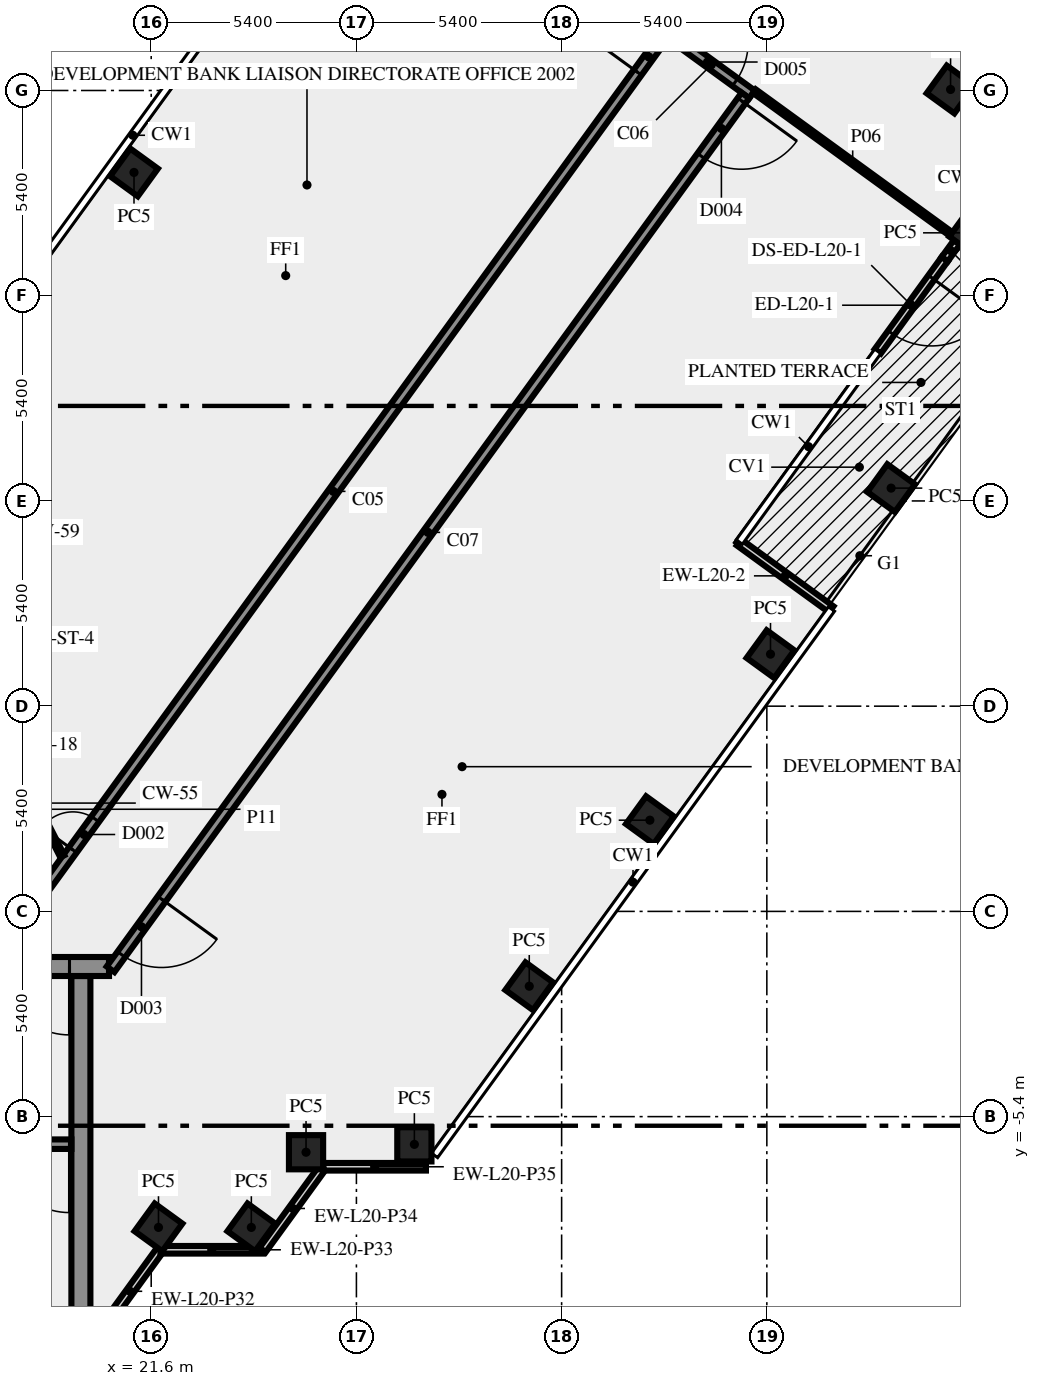
"""IFC4 building model, lengths in metres.
Left out: names, types, materials, properties, quantities, classifications, styles, units other than length and angle.
Written with IfcOpenShell. Run it as: python <this file> out.ifc"""

import sys

from ifc_helpers import new_model, si_unit, direction, frame, frame_2d, origin, origin_2d, place, context, subcontext, project, spatial, rectangle, extrude, element, fill, save


model = new_model("IFC4")
c1 = context("Model", 3, precision=1e-05, world=origin(), true_north=direction((0.0, 1.0)))
c2 = subcontext(c1, "Body", "Model", "MODEL_VIEW")
j1 = project(units=[si_unit("LENGTHUNIT", "METRE"), si_unit("PLANEANGLEUNIT", "RADIAN")], contexts=[c1])
p1 = place(None, origin())
s1 = spatial("IfcSite", under=j1, at=p1, CompositionType="ELEMENT")
p2 = place(p1, origin())
s2 = spatial("IfcBuilding", under=s1, at=p2, CompositionType="ELEMENT")
p3 = place(p2, frame((0.0, 0.0, 89.0)))
s3 = spatial("IfcBuildingStorey", under=s2, at=p3, CompositionType="ELEMENT", Elevation=89.0)
for number, where, z_axis, x_axis in (
    (1, (21.792, -8.315, 0.0), (0.0, 0.0, 1.0), (0.588, 0.809, 0.0)),
    (2, (24.235, -8.315, 0.0), (0.0, 0.0, 1.0), (0.588, 0.809, 0.0)),
    (3, (25.674, -6.337, 0.0), (0.0, 0.0, 1.0), (1.0, 0.0, 0.0)),
    (4, (28.525, -6.13, 0.0), (0.0, 0.0, 1.0), (1.0, 0.0, 0.0)),
    (5, (31.548, -1.969, 0.0), (0.0, 0.0, 1.0), (0.588, 0.809, 0.0)),
    (6, (34.722, 2.4, 0.0), (0.0, 0.0, 1.0), (0.588, 0.809, 0.0)),
    (7, (37.896, 6.769, 0.0), (0.0, 0.0, 1.0), (0.588, 0.809, 0.0)),
    (8, (41.07, 11.137, 0.0), (0.0, 0.0, 1.0), (0.588, 0.809, 0.0)),
    (9, (43.231, 17.854, 0.0), (0.0, 0.0, 1.0), (0.588, 0.809, 0.0)),
    (10, (42.635, 21.626, 0.0), (0.0, 0.0, 1.0), (-0.809, 0.588, 0.0)),
    (11, (21.147, 19.444, 0.0), (0.0, 0.0, 1.0), (-0.588, -0.809, 0.0)),
):
    element("IfcColumn", number, at=place(p3, frame(where, z_axis=z_axis, x_axis=x_axis)), inside=s3, PredefinedType="COLUMN", context=c2, shape_type="SweptSolid", body=[
        extrude(rectangle(XDim=0.9, YDim=0.9, at=origin_2d()), origin(), (0.0, 0.0, 1.0), 3.65),
    ])
p4 = place(p3, frame((39.494, 7.947, 0.0), z_axis=(0.0, 0.0, 1.0), x_axis=(-0.808999938455, 0.587808727036, 0.0)))
e12 = element("IfcWall", 12, at=p4, inside=s3, PredefinedType="SOLIDWALL", context=c2, shape_type="SweptSolid", body=[
    extrude(rectangle(XDim=3.0, YDim=0.2, at=frame_2d((1.5, 0.0))), origin(), (0.0, 0.0, 1.0), 3.65),
])
p5 = place(p3, frame((42.482, 17.164, 0.0), z_axis=(0.0, 0.0, 1.0), x_axis=(-0.587808727036, -0.808999938455, 0.0)))
e13 = element("IfcWall", 13, at=p5, inside=s3, PredefinedType="SOLIDWALL", context=c2, shape_type="SweptSolid", body=[
    extrude(rectangle(XDim=3.0, YDim=0.2, at=frame_2d((1.5, 0.0))), origin(), (0.0, 0.0, 1.0), 3.65),
])
p6 = place(p5, frame((0.6, 0.0, 0.0)))
e14 = element("IfcOpeningElement", 14, at=p6, cuts=e13, PredefinedType="OPENING", context=c2, shape_type="SweptSolid", body=[
    extrude(rectangle(XDim=1.8, YDim=2.4, at=frame_2d((0.9, 1.2))), frame((0.0, 0.11, 0.0), z_axis=(0.0, -1.0, 0.0), x_axis=(1.0, 0.0, 0.0)), (0.0, 0.0, 1.0), 0.22),
])
p7 = place(p3, frame((20.253, -11.083, 0.0), z_axis=(0.0, 0.0, 1.0), x_axis=(0.587766567315, 0.809030569476, 0.0)))
e15 = element("IfcWall", 15, at=p7, inside=s3, PredefinedType="SOLIDWALL", context=c2, shape_type="SweptSolid", body=[
    extrude(rectangle(XDim=2.688, YDim=0.2, at=frame_2d((1.344, 0.0))), origin(), (0.0, 0.0, 1.0), 3.65),
])
p8 = place(p3, frame((21.843, -8.904, 0.0), z_axis=(0.0, 0.0, 1.0), x_axis=(1.0, 0.0, 0.0)))
e16 = element("IfcWall", 16, at=p8, inside=s3, PredefinedType="SOLIDWALL", context=c2, shape_type="SweptSolid", body=[
    extrude(rectangle(XDim=2.7, YDim=0.2, at=frame_2d((1.35, 0.0))), origin(), (0.0, 0.0, 1.0), 3.65),
])
p9 = place(p3, frame((24.533, -8.909, 0.0), z_axis=(0.0, 0.0, 1.0), x_axis=(0.587720002413, 0.809064397168, 0.0)))
e17 = element("IfcWall", 17, at=p9, inside=s3, PredefinedType="SOLIDWALL", context=c2, shape_type="SweptSolid", body=[
    extrude(rectangle(XDim=2.7, YDim=0.2, at=frame_2d((1.35, 0.0))), origin(), (0.0, 0.0, 1.0), 3.65),
])
p10 = place(p3, frame((26.13, -6.719, 0.0), z_axis=(0.0, 0.0, 1.0), x_axis=(1.0, 0.0, 0.0)))
e18 = element("IfcWall", 18, at=p10, inside=s3, PredefinedType="SOLIDWALL", context=c2, shape_type="SweptSolid", body=[
    extrude(rectangle(XDim=2.7, YDim=0.2, at=frame_2d((1.35, 0.0))), origin(), (0.0, 0.0, 1.0), 3.65),
])
p11 = place(p3, frame((19.75, -10.5, 0.0), z_axis=(0.0, 0.0, 1.0), x_axis=(0.0, 1.0, 0.0)))
e19 = element("IfcWall", 19, at=p11, inside=s3, PredefinedType="SHEAR", context=c2, shape_type="SweptSolid", body=[
    extrude(rectangle(XDim=8.8, YDim=0.5, at=frame_2d((4.4, 0.0))), origin(), (0.0, 0.0, 1.0), 3.65),
])
p12 = place(p3, frame((19.5, -6.125, 0.0), z_axis=(0.0, 0.0, 1.0), x_axis=(-1.0, 0.0, 0.0)))
e20 = element("IfcWall", 20, at=p12, inside=s3, PredefinedType="SHEAR", context=c2, shape_type="SweptSolid", body=[
    extrude(rectangle(XDim=8.05, YDim=0.25, at=frame_2d((4.025, 0.0))), origin(), (0.0, 0.0, 1.0), 3.65),
])
p13 = place(p12, frame((0.05, 0.0, 0.0)))
e21 = element("IfcOpeningElement", 21, at=p13, cuts=e20, PredefinedType="OPENING", context=c2, shape_type="SweptSolid", body=[
    extrude(rectangle(XDim=1.8, YDim=2.1, at=frame_2d((0.9, 1.05))), frame((0.0, 0.135, 0.0), z_axis=(0.0, -1.0, 0.0), x_axis=(1.0, 0.0, 0.0)), (0.0, 0.0, 1.0), 0.27),
])
p14 = place(p3, frame((20.49, -1.45, 0.0), z_axis=(0.0, 0.0, 1.0), x_axis=(-1.0, 0.0, 0.0)))
e22 = element("IfcWall", 22, at=p14, inside=s3, PredefinedType="SHEAR", context=c2, shape_type="SweptSolid", body=[
    extrude(rectangle(XDim=40.98, YDim=0.5, at=frame_2d((20.49, 0.0))), origin(), (0.0, 0.0, 1.0), 3.65),
])
p15 = place(p14, frame((38.14, 0.0, 0.0)))
e23 = element("IfcOpeningElement", 23, at=p15, cuts=e22, PredefinedType="OPENING", context=c2, shape_type="SweptSolid", body=[
    extrude(rectangle(XDim=1.8, YDim=2.1, at=frame_2d((0.9, 1.05))), frame((0.0, 0.26, 0.0), z_axis=(0.0, -1.0, 0.0), x_axis=(1.0, 0.0, 0.0)), (0.0, 0.0, 1.0), 0.52),
])
p16 = place(p14, frame((35.89, 0.0, 0.0)))
e24 = element("IfcOpeningElement", 24, at=p16, cuts=e22, PredefinedType="OPENING", context=c2, shape_type="SweptSolid", body=[
    extrude(rectangle(XDim=0.9, YDim=2.1, at=frame_2d((0.45, 1.05))), frame((0.0, 0.26, 0.0), z_axis=(0.0, -1.0, 0.0), x_axis=(1.0, 0.0, 0.0)), (0.0, 0.0, 1.0), 0.52),
])
p17 = place(p14, frame((32.94, 0.0, 0.0)))
e25 = element("IfcOpeningElement", 25, at=p17, cuts=e22, PredefinedType="OPENING", context=c2, shape_type="SweptSolid", body=[
    extrude(rectangle(XDim=0.9, YDim=2.1, at=frame_2d((0.45, 1.05))), frame((0.0, 0.26, 0.0), z_axis=(0.0, -1.0, 0.0), x_axis=(1.0, 0.0, 0.0)), (0.0, 0.0, 1.0), 0.52),
])
p18 = place(p14, frame((21.765, 0.0, 0.0)))
e26 = element("IfcOpeningElement", 26, at=p18, cuts=e22, PredefinedType="OPENING", context=c2, shape_type="SweptSolid", body=[
    extrude(rectangle(XDim=2.0, YDim=2.1, at=frame_2d((1.0, 1.05))), frame((0.0, 0.26, 0.0), z_axis=(0.0, -1.0, 0.0), x_axis=(1.0, 0.0, 0.0)), (0.0, 0.0, 1.0), 0.52),
])
p19 = place(p14, frame((7.14, 0.0, 0.0)))
e27 = element("IfcOpeningElement", 27, at=p19, cuts=e22, PredefinedType="OPENING", context=c2, shape_type="SweptSolid", body=[
    extrude(rectangle(XDim=0.9, YDim=2.1, at=frame_2d((0.45, 1.05))), frame((0.0, 0.26, 0.0), z_axis=(0.0, -1.0, 0.0), x_axis=(1.0, 0.0, 0.0)), (0.0, 0.0, 1.0), 0.52),
])
p20 = place(p14, frame((5.028, 0.0, 0.0)))
e28 = element("IfcOpeningElement", 28, at=p20, cuts=e22, PredefinedType="OPENING", context=c2, shape_type="SweptSolid", body=[
    extrude(rectangle(XDim=0.8, YDim=2.1, at=frame_2d((0.4, 1.05))), frame((0.0, 0.26, 0.0), z_axis=(0.0, -1.0, 0.0), x_axis=(1.0, 0.0, 0.0)), (0.0, 0.0, 1.0), 0.52),
])
p21 = place(p14, frame((3.452, 0.0, 0.0)))
e29 = element("IfcOpeningElement", 29, at=p21, cuts=e22, PredefinedType="OPENING", context=c2, shape_type="SweptSolid", body=[
    extrude(rectangle(XDim=0.8, YDim=2.1, at=frame_2d((0.4, 1.05))), frame((0.0, 0.26, 0.0), z_axis=(0.0, -1.0, 0.0), x_axis=(1.0, 0.0, 0.0)), (0.0, 0.0, 1.0), 0.52),
])
p22 = place(p14, frame((1.04, 0.0, 0.0)))
e30 = element("IfcOpeningElement", 30, at=p22, cuts=e22, PredefinedType="OPENING", context=c2, shape_type="SweptSolid", body=[
    extrude(rectangle(XDim=1.8, YDim=2.1, at=frame_2d((0.9, 1.05))), frame((0.0, 0.26, 0.0), z_axis=(0.0, -1.0, 0.0), x_axis=(1.0, 0.0, 0.0)), (0.0, 0.0, 1.0), 0.52),
])
p23 = place(p3, frame((17.545, -1.125, 0.0), z_axis=(0.0, 0.0, 1.0), x_axis=(0.587786330937, 0.809016210693, 0.0)))
e31 = element("IfcWall", 31, at=p23, inside=s3, PredefinedType="SOLIDWALL", context=c2, shape_type="SweptSolid", body=[
    extrude(rectangle(XDim=30.103, YDim=0.25, at=frame_2d((15.052, 0.0))), origin(), (0.0, 0.0, 1.0), 3.65),
])
p24 = place(p23, frame((28.679, 0.0, 0.0)))
e32 = element("IfcOpeningElement", 32, at=p24, cuts=e31, PredefinedType="OPENING", context=c2, shape_type="SweptSolid", body=[
    extrude(rectangle(XDim=1.0, YDim=2.1, at=frame_2d((0.5, 1.05))), frame((0.0, 0.135, 0.0), z_axis=(0.0, -1.0, 0.0), x_axis=(1.0, 0.0, 0.0)), (0.0, 0.0, 1.0), 0.27),
])
p25 = place(p23, frame((3.391, 0.0, 0.0)))
e33 = element("IfcOpeningElement", 33, at=p25, cuts=e31, PredefinedType="OPENING", context=c2, shape_type="SweptSolid", body=[
    extrude(rectangle(XDim=1.0, YDim=2.1, at=frame_2d((0.5, 1.05))), frame((0.0, 0.135, 0.0), z_axis=(0.0, -1.0, 0.0), x_axis=(1.0, 0.0, 0.0)), (0.0, 0.0, 1.0), 0.27),
])
p26 = place(p3, frame((35.267, 23.054, 0.0), z_axis=(0.0, 0.0, 1.0), x_axis=(0.809038743598, -0.587755315891, 0.0)))
e34 = element("IfcWall", 34, at=p26, inside=s3, PredefinedType="SOLIDWALL", context=c2, shape_type="SweptSolid", body=[
    extrude(rectangle(XDim=2.65, YDim=0.25, at=frame_2d((1.325, 0.0))), origin(), (0.0, 0.0, 1.0), 3.65),
])
p27 = place(p26, frame((0.3, 0.0, 0.0)))
e35 = element("IfcOpeningElement", 35, at=p27, cuts=e34, PredefinedType="OPENING", context=c2, shape_type="SweptSolid", body=[
    extrude(rectangle(XDim=1.8, YDim=2.1, at=frame_2d((0.9, 1.05))), frame((0.0, 0.135, 0.0), z_axis=(0.0, -1.0, 0.0), x_axis=(1.0, 0.0, 0.0)), (0.0, 0.0, 1.0), 0.27),
])
p28 = place(p3, frame((37.236, 21.469, 0.0), z_axis=(0.0, 0.0, 1.0), x_axis=(-0.58778344073, -0.809018310549, 0.0)))
e36 = element("IfcWall", 36, at=p28, inside=s3, PredefinedType="SOLIDWALL", context=c2, shape_type="SweptSolid", body=[
    extrude(rectangle(XDim=28.42, YDim=0.25, at=frame_2d((14.21, 0.0))), origin(), (0.0, 0.0, 1.0), 3.65),
])
p29 = place(p28, frame((26.137, 0.0, 0.0)))
e37 = element("IfcOpeningElement", 37, at=p29, cuts=e36, PredefinedType="OPENING", context=c2, shape_type="SweptSolid", body=[
    extrude(rectangle(XDim=1.8, YDim=2.1, at=frame_2d((0.9, 1.05))), frame((0.0, 0.135, 0.0), z_axis=(0.0, -1.0, 0.0), x_axis=(1.0, 0.0, 0.0)), (0.0, 0.0, 1.0), 0.27),
])
p30 = place(p28, frame((0.175, 0.0, 0.0)))
e38 = element("IfcOpeningElement", 38, at=p30, cuts=e36, PredefinedType="OPENING", context=c2, shape_type="SweptSolid", body=[
    extrude(rectangle(XDim=1.8, YDim=2.1, at=frame_2d((0.9, 1.05))), frame((0.0, 0.135, 0.0), z_axis=(0.0, -1.0, 0.0), x_axis=(1.0, 0.0, 0.0)), (0.0, 0.0, 1.0), 0.27),
])
p31 = place(p3, frame((42.646, 17.823, 0.0), z_axis=(0.0, 0.0, 1.0), x_axis=(-0.809038102754, 0.587756198004, 0.0)))
e39 = element("IfcWall", 39, at=p31, inside=s3, PredefinedType="PARTITIONING", context=c2, shape_type="SweptSolid", body=[
    extrude(rectangle(XDim=6.395, YDim=0.12, at=frame_2d((3.197, 0.0))), origin(), (0.0, 0.0, 1.0), 3.65),
])
p32 = place(p3, frame((18.0, 3.925, 0.0), z_axis=(0.0, 0.0, 1.0), x_axis=(0.453950796792, -0.891026752736, 0.0)))
e40 = element("IfcWall", 40, at=p32, inside=s3, PredefinedType="PARTITIONING", context=c2, shape_type="SweptSolid", body=[
    extrude(rectangle(XDim=2.778, YDim=0.12, at=frame_2d((1.389, 0.0))), origin(), (0.0, 0.0, 1.0), 3.65),
])
p33 = place(p3, frame((42.482, 17.164, 0.0), z_axis=(0.0, 0.0, 1.0), x_axis=(0.58771776895, 0.809066019593, 0.0)))
e41 = element("IfcWall", 41, at=p33, inside=s3, PredefinedType="SOLIDWALL", context=c2, shape_type="SweptSolid", body=[
    extrude(rectangle(XDim=0.544, YDim=0.2, at=frame_2d((0.272, 0.0))), origin(), (0.0, 0.0, 1.0), 3.65),
])
p34 = place(p6, origin())
e42 = element("IfcDoor", 42, at=p34, inside=s3, OperationType="DOUBLE_DOOR_SINGLE_SWING", PredefinedType="DOOR", context=c2, shape_type="SweptSolid", body=[
    extrude(rectangle(XDim=1.8, YDim=2.4, at=frame_2d((0.9, 1.2))), frame((0.0, 0.025, 0.0), z_axis=(0.0, -1.0, 0.0), x_axis=(1.0, 0.0, 0.0)), (0.0, 0.0, 1.0), 0.05),
])
fill(e14, e42)
p35 = place(p13, origin())
e43 = element("IfcDoor", 43, at=p35, inside=s3, OperationType="DOUBLE_DOOR_SINGLE_SWING", PredefinedType="DOOR", context=c2, shape_type="SweptSolid", body=[
    extrude(rectangle(XDim=1.8, YDim=2.1, at=frame_2d((0.9, 1.05))), frame((0.0, 0.025, 0.0), z_axis=(0.0, -1.0, 0.0), x_axis=(1.0, 0.0, 0.0)), (0.0, 0.0, 1.0), 0.05),
])
fill(e21, e43)
p36 = place(p22, origin())
e44 = element("IfcDoor", 44, at=p36, inside=s3, OperationType="DOUBLE_DOOR_SINGLE_SWING", PredefinedType="DOOR", context=c2, shape_type="SweptSolid", body=[
    extrude(rectangle(XDim=1.8, YDim=2.1, at=frame_2d((0.9, 1.05))), frame((0.0, 0.025, 0.0), z_axis=(0.0, -1.0, 0.0), x_axis=(1.0, 0.0, 0.0)), (0.0, 0.0, 1.0), 0.05),
])
fill(e30, e44)
p37 = place(p24, origin())
e45 = element("IfcDoor", 45, at=p37, inside=s3, OperationType="SINGLE_SWING_RIGHT", PredefinedType="DOOR", context=c2, shape_type="SweptSolid", body=[
    extrude(rectangle(XDim=1.0, YDim=2.1, at=frame_2d((0.5, 1.05))), frame((0.0, 0.025, 0.0), z_axis=(0.0, -1.0, 0.0), x_axis=(1.0, 0.0, 0.0)), (0.0, 0.0, 1.0), 0.05),
])
fill(e32, e45)
p38 = place(p25, origin())
e46 = element("IfcDoor", 46, at=p38, inside=s3, OperationType="SINGLE_SWING_LEFT", PredefinedType="DOOR", context=c2, shape_type="SweptSolid", body=[
    extrude(rectangle(XDim=1.0, YDim=2.1, at=frame_2d((0.5, 1.05))), frame((0.0, 0.025, 0.0), z_axis=(0.0, -1.0, 0.0), x_axis=(1.0, 0.0, 0.0)), (0.0, 0.0, 1.0), 0.05),
])
fill(e33, e46)
p39 = place(p29, origin())
e47 = element("IfcDoor", 47, at=p39, inside=s3, OperationType="DOUBLE_DOOR_SINGLE_SWING", PredefinedType="DOOR", context=c2, shape_type="SweptSolid", body=[
    extrude(rectangle(XDim=1.8, YDim=2.1, at=frame_2d((0.9, 1.05))), frame((0.0, 0.025, 0.0), z_axis=(0.0, -1.0, 0.0), x_axis=(1.0, 0.0, 0.0)), (0.0, 0.0, 1.0), 0.05),
])
fill(e37, e47)
p40 = place(p30, origin())
e48 = element("IfcDoor", 48, at=p40, inside=s3, OperationType="DOUBLE_DOOR_SINGLE_SWING", PredefinedType="DOOR", context=c2, shape_type="SweptSolid", body=[
    extrude(rectangle(XDim=1.8, YDim=2.1, at=frame_2d((0.9, 1.05))), frame((0.0, 0.025, 0.0), z_axis=(0.0, -1.0, 0.0), x_axis=(1.0, 0.0, 0.0)), (0.0, 0.0, 1.0), 0.05),
])
fill(e38, e48)
p41 = place(p27, origin())
e49 = element("IfcDoor", 49, at=p41, inside=s3, OperationType="DOUBLE_DOOR_SINGLE_SWING", PredefinedType="DOOR", context=c2, shape_type="SweptSolid", body=[
    extrude(rectangle(XDim=1.8, YDim=2.1, at=frame_2d((0.9, 1.05))), frame((0.0, 0.025, 0.0), z_axis=(0.0, -1.0, 0.0), x_axis=(1.0, 0.0, 0.0)), (0.0, 0.0, 1.0), 0.05),
])
fill(e35, e49)
save(model, sys.argv[1])
